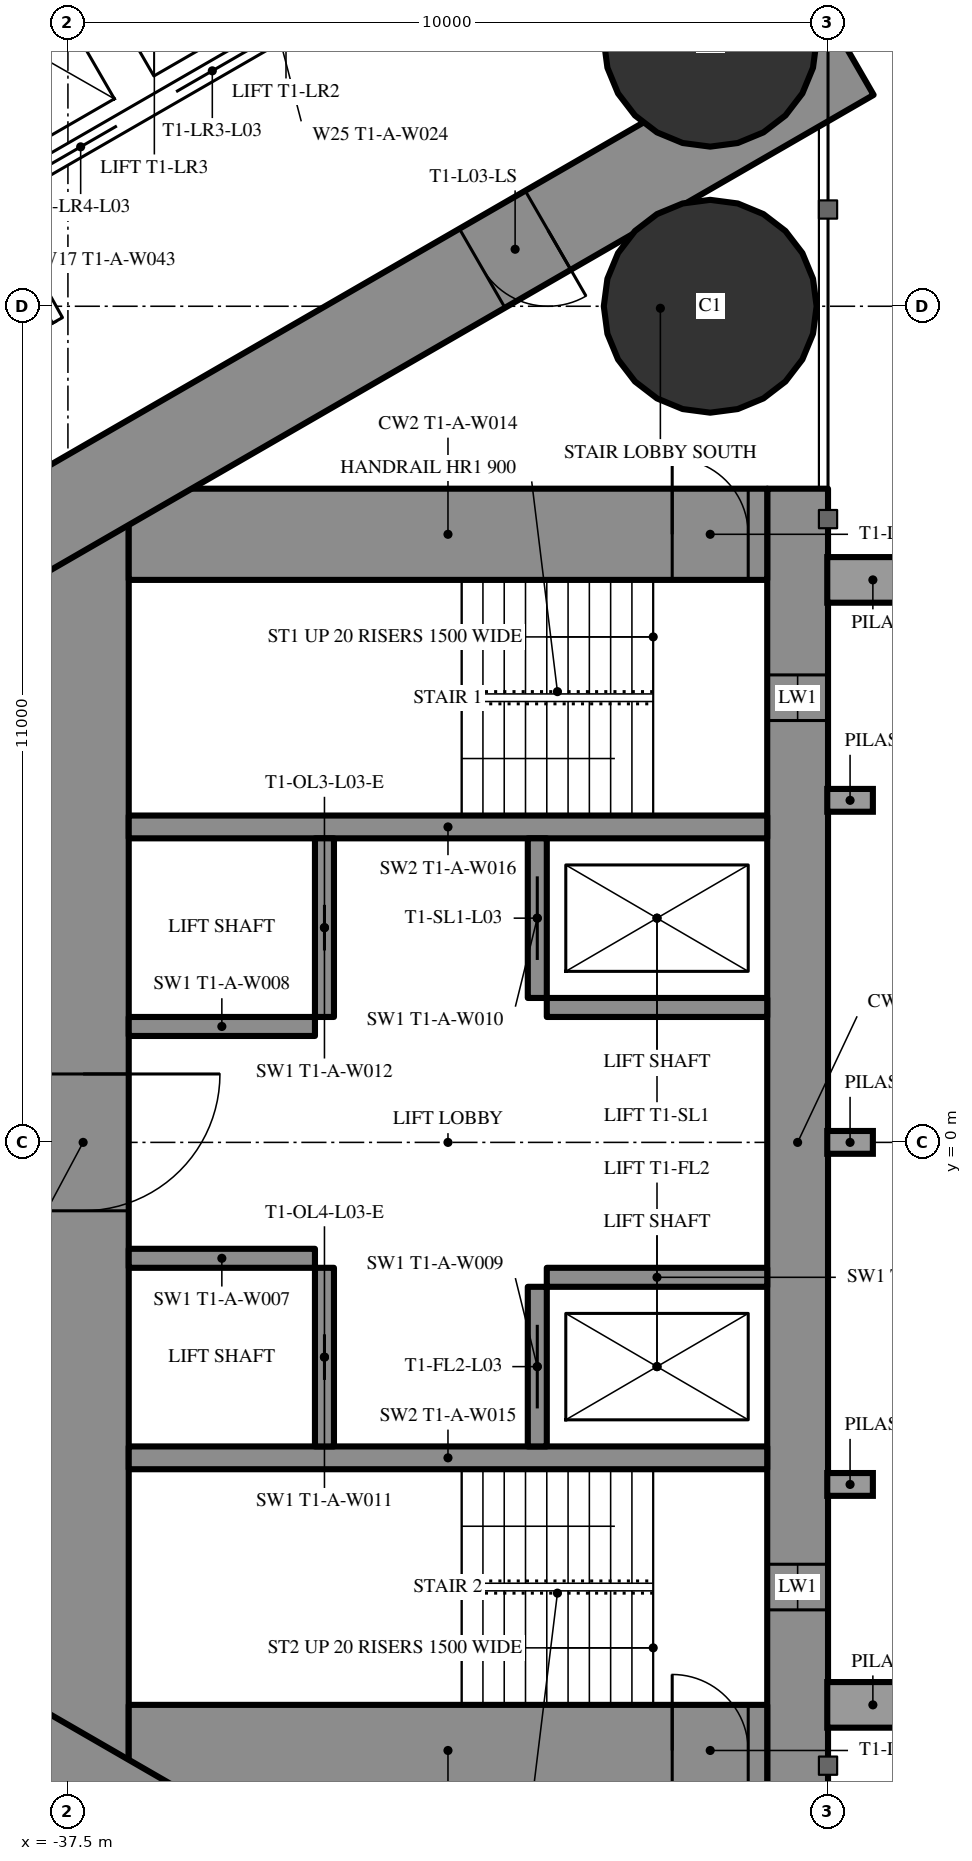
"""IFC4 building model, lengths in metres.
Left out: names, types, materials, properties, quantities, classifications, styles, units other than length and angle.
Written with IfcOpenShell. Run it as: python <this file> out.ifc"""

import sys

from ifc_helpers import new_model, si_unit, direction, frame, frame_2d, origin, origin_2d, place, context, subcontext, project, spatial, rectangle, hollow_circle, extrude, element, fill, save


model = new_model("IFC4")
c1 = context("Model", 3, precision=1e-05, world=origin(), true_north=direction((0.0, 1.0)))
c2 = subcontext(c1, "Body", "Model", "MODEL_VIEW")
j1 = project(units=[si_unit("LENGTHUNIT", "METRE"), si_unit("PLANEANGLEUNIT", "RADIAN")], contexts=[c1])
p1 = place(None, origin())
s1 = spatial("IfcSite", under=j1, at=p1, CompositionType="ELEMENT")
p2 = place(p1, origin())
s2 = spatial("IfcBuilding", under=s1, at=p2, CompositionType="ELEMENT")
p3 = place(p2, frame((0.0, 0.0, 18.0)))
s3 = spatial("IfcBuildingStorey", under=s2, at=p3, CompositionType="ELEMENT", Elevation=18.0)
for number, where, z_axis, x_axis in (
    (1, (-29.05, 11.0, 0.0), (0.0, 0.0, 1.0), (1.0, 0.0, 0.0)),
    (2, (-29.05, 14.5, 0.0), (0.0, 0.0, 1.0), (1.0, 0.0, 0.0)),
):
    element("IfcColumn", number, at=place(p3, frame(where, z_axis=z_axis, x_axis=x_axis)), inside=s3, PredefinedType="COLUMN", context=c2, shape_type="SweptSolid", body=[
        extrude(hollow_circle(Radius=1.4, WallThickness=0.12, at=origin_2d()), origin(), (0.0, 0.0, 1.0), 3.5),
    ])
p4 = place(p3, frame((-27.9, 8.6, 0.0), z_axis=(0.0, 0.0, 1.0), x_axis=(0.0, -1.0, 0.0)))
e3 = element("IfcWall", 3, at=p4, inside=s3, PredefinedType="SHEAR", context=c2, shape_type="SweptSolid", body=[
    extrude(rectangle(XDim=17.2, YDim=0.8, at=frame_2d((8.6, 0.0))), origin(), (0.0, 0.0, 1.0), 3.5),
])
p5 = place(p4, frame((2.45, 0.0, 0.6)))
e4 = element("IfcOpeningElement", 4, at=p5, cuts=e3, PredefinedType="OPENING", context=c2, shape_type="SweptSolid", body=[
    extrude(rectangle(XDim=0.6, YDim=2.1, at=frame_2d((0.3, 1.05))), frame((0.0, 0.41, 0.0), z_axis=(0.0, -1.0, 0.0), x_axis=(1.0, 0.0, 0.0)), (0.0, 0.0, 1.0), 0.82),
])
p6 = place(p4, frame((14.15, 0.0, 0.6)))
e5 = element("IfcOpeningElement", 5, at=p6, cuts=e3, PredefinedType="OPENING", context=c2, shape_type="SweptSolid", body=[
    extrude(rectangle(XDim=0.6, YDim=2.1, at=frame_2d((0.3, 1.05))), frame((0.0, 0.41, 0.0), z_axis=(0.0, -1.0, 0.0), x_axis=(1.0, 0.0, 0.0)), (0.0, 0.0, 1.0), 0.82),
])
p7 = place(p3, frame((-37.3, 8.6, 0.0), z_axis=(0.0, 0.0, 1.0), x_axis=(0.0, -1.0, 0.0)))
e6 = element("IfcWall", 6, at=p7, inside=s3, PredefinedType="SHEAR", context=c2, shape_type="SweptSolid", body=[
    extrude(rectangle(XDim=17.2, YDim=1.2, at=frame_2d((8.6, 0.0))), origin(), (0.0, 0.0, 1.0), 3.5),
])
p8 = place(p7, frame((7.7, 0.0, 0.0)))
e7 = element("IfcOpeningElement", 7, at=p8, cuts=e6, PredefinedType="OPENING", context=c2, shape_type="SweptSolid", body=[
    extrude(rectangle(XDim=1.8, YDim=2.2, at=frame_2d((0.9, 1.1))), frame((0.0, 0.61, 0.0), z_axis=(0.0, -1.0, 0.0), x_axis=(1.0, 0.0, 0.0)), (0.0, 0.0, 1.0), 1.22),
])
p9 = place(p3, frame((-28.3, 8.0, 0.0), z_axis=(0.0, 0.0, 1.0), x_axis=(-1.0, 0.0, 0.0)))
e8 = element("IfcWall", 8, at=p9, inside=s3, PredefinedType="SHEAR", context=c2, shape_type="SweptSolid", body=[
    extrude(rectangle(XDim=8.4, YDim=1.2, at=frame_2d((4.2, 0.0))), origin(), (0.0, 0.0, 1.0), 3.5),
])
p10 = place(p9, frame((0.25, 0.0, 0.0)))
e9 = element("IfcOpeningElement", 9, at=p10, cuts=e8, PredefinedType="OPENING", context=c2, shape_type="SweptSolid", body=[
    extrude(rectangle(XDim=1.0, YDim=2.2, at=frame_2d((0.5, 1.1))), frame((0.0, 0.61, 0.0), z_axis=(0.0, -1.0, 0.0), x_axis=(1.0, 0.0, 0.0)), (0.0, 0.0, 1.0), 1.22),
])
p11 = place(p3, frame((-28.3, -8.0, 0.0), z_axis=(0.0, 0.0, 1.0), x_axis=(-1.0, 0.0, 0.0)))
e10 = element("IfcWall", 10, at=p11, inside=s3, PredefinedType="SHEAR", context=c2, shape_type="SweptSolid", body=[
    extrude(rectangle(XDim=8.4, YDim=1.2, at=frame_2d((4.2, 0.0))), origin(), (0.0, 0.0, 1.0), 3.5),
])
p12 = place(p11, frame((0.25, 0.0, 0.0)))
e11 = element("IfcOpeningElement", 11, at=p12, cuts=e10, PredefinedType="OPENING", context=c2, shape_type="SweptSolid", body=[
    extrude(rectangle(XDim=1.0, YDim=2.2, at=frame_2d((0.5, 1.1))), frame((0.0, 0.61, 0.0), z_axis=(0.0, -1.0, 0.0), x_axis=(1.0, 0.0, 0.0)), (0.0, 0.0, 1.0), 1.22),
])
for number, where, z_axis, x_axis in (
    (12, (-28.3, 4.15, 0.0), (0.0, 0.0, 1.0), (-1.0, 0.0, 0.0)),
    (13, (-28.3, -4.15, 0.0), (0.0, 0.0, 1.0), (-1.0, 0.0, 0.0)),
):
    element("IfcWall", number, at=place(p3, frame(where, z_axis=z_axis, x_axis=x_axis)), inside=s3, PredefinedType="SHEAR", context=c2, shape_type="SweptSolid", body=[
        extrude(rectangle(XDim=8.4, YDim=0.3, at=frame_2d((4.2, 0.0))), origin(), (0.0, 0.0, 1.0), 3.5),
    ])
p13 = place(p3, frame((-31.325, 4.0, 0.0), z_axis=(0.0, 0.0, 1.0), x_axis=(0.0, -1.0, 0.0)))
e14 = element("IfcWall", 14, at=p13, inside=s3, PredefinedType="SHEAR", context=c2, shape_type="SweptSolid", body=[
    extrude(rectangle(XDim=2.1, YDim=0.25, at=frame_2d((1.05, 0.0))), origin(), (0.0, 0.0, 1.0), 3.5),
])
p14 = place(p13, frame((0.5, 0.0, 0.0)))
e15 = element("IfcOpeningElement", 15, at=p14, cuts=e14, PredefinedType="OPENING", context=c2, shape_type="SweptSolid", body=[
    extrude(rectangle(XDim=1.1, YDim=2.2, at=frame_2d((0.55, 1.1))), frame((0.0, 0.135, 0.0), z_axis=(0.0, -1.0, 0.0), x_axis=(1.0, 0.0, 0.0)), (0.0, 0.0, 1.0), 0.27),
])
p15 = place(p3, frame((-34.125, 4.0, 0.0), z_axis=(0.0, 0.0, 1.0), x_axis=(0.0, -1.0, 0.0)))
e16 = element("IfcWall", 16, at=p15, inside=s3, PredefinedType="SHEAR", context=c2, shape_type="SweptSolid", body=[
    extrude(rectangle(XDim=2.35, YDim=0.25, at=frame_2d((1.175, 0.0))), origin(), (0.0, 0.0, 1.0), 3.5),
])
p16 = place(p15, frame((0.875, 0.0, 0.0)))
e17 = element("IfcOpeningElement", 17, at=p16, cuts=e16, PredefinedType="OPENING", context=c2, shape_type="SweptSolid", body=[
    extrude(rectangle(XDim=0.6, YDim=2.0, at=frame_2d((0.3, 1.0))), frame((0.0, 0.135, 0.0), z_axis=(0.0, -1.0, 0.0), x_axis=(1.0, 0.0, 0.0)), (0.0, 0.0, 1.0), 0.27),
])
p17 = place(p3, frame((-28.3, 1.775, 0.0), z_axis=(0.0, 0.0, 1.0), x_axis=(-1.0, 0.0, 0.0)))
e18 = element("IfcWall", 18, at=p17, inside=s3, PredefinedType="SHEAR", context=c2, shape_type="SweptSolid", body=[
    extrude(rectangle(XDim=2.9, YDim=0.25, at=frame_2d((1.45, 0.0))), origin(), (0.0, 0.0, 1.0), 3.5),
])
p18 = place(p3, frame((-34.25, 1.525, 0.0), z_axis=(0.0, 0.0, 1.0), x_axis=(-1.0, 0.0, 0.0)))
e19 = element("IfcWall", 19, at=p18, inside=s3, PredefinedType="SHEAR", context=c2, shape_type="SweptSolid", body=[
    extrude(rectangle(XDim=2.45, YDim=0.25, at=frame_2d((1.225, 0.0))), origin(), (0.0, 0.0, 1.0), 3.5),
])
p19 = place(p3, frame((-31.325, -1.9, 0.0), z_axis=(0.0, 0.0, 1.0), x_axis=(0.0, -1.0, 0.0)))
e20 = element("IfcWall", 20, at=p19, inside=s3, PredefinedType="SHEAR", context=c2, shape_type="SweptSolid", body=[
    extrude(rectangle(XDim=2.1, YDim=0.25, at=frame_2d((1.05, 0.0))), origin(), (0.0, 0.0, 1.0), 3.5),
])
p20 = place(p19, frame((0.5, 0.0, 0.0)))
e21 = element("IfcOpeningElement", 21, at=p20, cuts=e20, PredefinedType="OPENING", context=c2, shape_type="SweptSolid", body=[
    extrude(rectangle(XDim=1.1, YDim=2.2, at=frame_2d((0.55, 1.1))), frame((0.0, 0.135, 0.0), z_axis=(0.0, -1.0, 0.0), x_axis=(1.0, 0.0, 0.0)), (0.0, 0.0, 1.0), 0.27),
])
p21 = place(p3, frame((-34.125, -1.65, 0.0), z_axis=(0.0, 0.0, 1.0), x_axis=(0.0, -1.0, 0.0)))
e22 = element("IfcWall", 22, at=p21, inside=s3, PredefinedType="SHEAR", context=c2, shape_type="SweptSolid", body=[
    extrude(rectangle(XDim=2.35, YDim=0.25, at=frame_2d((1.175, 0.0))), origin(), (0.0, 0.0, 1.0), 3.5),
])
p22 = place(p21, frame((0.875, 0.0, 0.0)))
e23 = element("IfcOpeningElement", 23, at=p22, cuts=e22, PredefinedType="OPENING", context=c2, shape_type="SweptSolid", body=[
    extrude(rectangle(XDim=0.6, YDim=2.0, at=frame_2d((0.3, 1.0))), frame((0.0, 0.135, 0.0), z_axis=(0.0, -1.0, 0.0), x_axis=(1.0, 0.0, 0.0)), (0.0, 0.0, 1.0), 0.27),
])
p23 = place(p3, frame((-28.3, -1.775, 0.0), z_axis=(0.0, 0.0, 1.0), x_axis=(-1.0, 0.0, 0.0)))
e24 = element("IfcWall", 24, at=p23, inside=s3, PredefinedType="SHEAR", context=c2, shape_type="SweptSolid", body=[
    extrude(rectangle(XDim=2.9, YDim=0.25, at=frame_2d((1.45, 0.0))), origin(), (0.0, 0.0, 1.0), 3.5),
])
p24 = place(p3, frame((-34.25, -1.525, 0.0), z_axis=(0.0, 0.0, 1.0), x_axis=(-1.0, 0.0, 0.0)))
e25 = element("IfcWall", 25, at=p24, inside=s3, PredefinedType="SHEAR", context=c2, shape_type="SweptSolid", body=[
    extrude(rectangle(XDim=2.45, YDim=0.25, at=frame_2d((1.225, 0.0))), origin(), (0.0, 0.0, 1.0), 3.5),
])
p25 = place(p3, frame((-27.2, 14.3, 0.0), z_axis=(0.0, 0.0, 1.0), x_axis=(-0.866026593062, -0.499997940104, 0.0)))
e26 = element("IfcWall", 26, at=p25, inside=s3, PredefinedType="SHEAR", context=c2, shape_type="SweptSolid", body=[
    extrude(rectangle(XDim=28.946, YDim=1.2, at=frame_2d((14.473, 0.0))), origin(), (0.0, 0.0, 1.0), 3.5),
])
p26 = place(p25, frame((4.6, 0.0, 0.0)))
e27 = element("IfcOpeningElement", 27, at=p26, cuts=e26, PredefinedType="OPENING", context=c2, shape_type="SweptSolid", body=[
    extrude(rectangle(XDim=1.0, YDim=2.2, at=frame_2d((0.5, 1.1))), frame((0.0, 0.61, 0.0), z_axis=(0.0, -1.0, 0.0), x_axis=(1.0, 0.0, 0.0)), (0.0, 0.0, 1.0), 1.22),
])
p27 = place(p25, frame((13.395, 0.0, 0.0)))
e28 = element("IfcOpeningElement", 28, at=p27, cuts=e26, PredefinedType="OPENING", context=c2, shape_type="SweptSolid", body=[
    extrude(rectangle(XDim=1.8, YDim=2.2, at=frame_2d((0.9, 1.1))), frame((0.0, 0.61, 0.0), z_axis=(0.0, -1.0, 0.0), x_axis=(1.0, 0.0, 0.0)), (0.0, 0.0, 1.0), 1.22),
])
p28 = place(p3, frame((-27.2, -14.3, 0.0), z_axis=(0.0, 0.0, 1.0), x_axis=(-0.866024021859, 0.500002393557, 0.0)))
e29 = element("IfcWall", 29, at=p28, inside=s3, PredefinedType="SHEAR", context=c2, shape_type="SweptSolid", body=[
    extrude(rectangle(XDim=27.907, YDim=1.2, at=frame_2d((13.954, 0.0))), origin(), (0.0, 0.0, 1.0), 3.5),
])
p29 = place(p28, frame((4.6, 0.0, 0.0)))
e30 = element("IfcOpeningElement", 30, at=p29, cuts=e29, PredefinedType="OPENING", context=c2, shape_type="SweptSolid", body=[
    extrude(rectangle(XDim=1.0, YDim=2.2, at=frame_2d((0.5, 1.1))), frame((0.0, 0.61, 0.0), z_axis=(0.0, -1.0, 0.0), x_axis=(1.0, 0.0, 0.0)), (0.0, 0.0, 1.0), 1.22),
])
p30 = place(p28, frame((13.395, 0.0, 0.0)))
e31 = element("IfcOpeningElement", 31, at=p30, cuts=e29, PredefinedType="OPENING", context=c2, shape_type="SweptSolid", body=[
    extrude(rectangle(XDim=1.8, YDim=2.2, at=frame_2d((0.9, 1.1))), frame((0.0, 0.61, 0.0), z_axis=(0.0, -1.0, 0.0), x_axis=(1.0, 0.0, 0.0)), (0.0, 0.0, 1.0), 1.22),
])
p31 = place(p3, frame((-37.7, 10.894, 0.0), z_axis=(0.0, 0.0, 1.0), x_axis=(-0.866027905338, -0.499995667157, 0.0)))
e32 = element("IfcWall", 32, at=p31, inside=s3, PredefinedType="PARTITIONING", context=c2, shape_type="SweptSolid", body=[
    extrude(rectangle(XDim=21.787, YDim=0.2, at=frame_2d((10.894, 0.0))), origin(), (0.0, 0.0, 1.0), 3.25),
])
p32 = place(p31, frame((11.78, 0.0, 0.0)))
e33 = element("IfcOpeningElement", 33, at=p32, cuts=e32, PredefinedType="OPENING", context=c2, shape_type="SweptSolid", body=[
    extrude(rectangle(XDim=0.95, YDim=2.2, at=frame_2d((0.475, 1.1))), frame((0.0, 0.11, 0.0), z_axis=(0.0, -1.0, 0.0), x_axis=(1.0, 0.0, 0.0)), (0.0, 0.0, 1.0), 0.22),
])
p33 = place(p31, frame((7.73, 0.0, 0.0)))
e34 = element("IfcOpeningElement", 34, at=p33, cuts=e32, PredefinedType="OPENING", context=c2, shape_type="SweptSolid", body=[
    extrude(rectangle(XDim=0.95, YDim=2.2, at=frame_2d((0.475, 1.1))), frame((0.0, 0.11, 0.0), z_axis=(0.0, -1.0, 0.0), x_axis=(1.0, 0.0, 0.0)), (0.0, 0.0, 1.0), 0.22),
])
p34 = place(p3, frame((-36.92, -11.344, 0.0), z_axis=(0.0, 0.0, 1.0), x_axis=(-0.866028313256, 0.499994960614, 0.0)))
e35 = element("IfcWall", 35, at=p34, inside=s3, PredefinedType="PARTITIONING", context=c2, shape_type="SweptSolid", body=[
    extrude(rectangle(XDim=22.568, YDim=0.2, at=frame_2d((11.284, 0.0))), origin(), (0.0, 0.0, 1.0), 3.25),
])
p35 = place(p34, frame((15.03, 0.0, 0.0)))
e36 = element("IfcOpeningElement", 36, at=p35, cuts=e35, PredefinedType="OPENING", context=c2, shape_type="SweptSolid", body=[
    extrude(rectangle(XDim=0.95, YDim=2.2, at=frame_2d((0.475, 1.1))), frame((0.0, 0.11, 0.0), z_axis=(0.0, -1.0, 0.0), x_axis=(1.0, 0.0, 0.0)), (0.0, 0.0, 1.0), 0.22),
])
p36 = place(p34, frame((3.35, 0.0, 0.0)))
e37 = element("IfcOpeningElement", 37, at=p36, cuts=e35, PredefinedType="OPENING", context=c2, shape_type="SweptSolid", body=[
    extrude(rectangle(XDim=1.0, YDim=2.2, at=frame_2d((0.5, 1.1))), frame((0.0, 0.11, 0.0), z_axis=(0.0, -1.0, 0.0), x_axis=(1.0, 0.0, 0.0)), (0.0, 0.0, 1.0), 0.22),
])
p37 = place(p3, frame((-38.513, 12.392, 0.0), z_axis=(0.0, 0.0, 1.0), x_axis=(0.485585508183, -0.874189175317, 0.0)))
e38 = element("IfcWall", 38, at=p37, inside=s3, PredefinedType="PARTITIONING", context=c2, shape_type="SweptSolid", body=[
    extrude(rectangle(XDim=1.805, YDim=0.15, at=frame_2d((0.902, 0.0))), origin(), (0.0, 0.0, 1.0), 3.25),
])
p38 = place(p3, frame((-31.01, 16.747, 0.0), z_axis=(0.0, 0.0, 1.0), x_axis=(-0.866028165386, -0.499995216735, 0.0)))
e39 = element("IfcWall", 39, at=p38, inside=s3, PredefinedType="PARTITIONING", context=c2, shape_type="SweptSolid", body=[
    extrude(rectangle(XDim=8.6, YDim=0.25, at=frame_2d((4.3, 0.0))), origin(), (0.0, 0.0, 1.0), 3.25),
])
p39 = place(p38, frame((0.75, 0.0, 0.0)))
e40 = element("IfcOpeningElement", 40, at=p39, cuts=e39, PredefinedType="OPENING", context=c2, shape_type="SweptSolid", body=[
    extrude(rectangle(XDim=1.1, YDim=2.2, at=frame_2d((0.55, 1.1))), frame((0.0, 0.135, 0.0), z_axis=(0.0, -1.0, 0.0), x_axis=(1.0, 0.0, 0.0)), (0.0, 0.0, 1.0), 0.27),
])
p40 = place(p38, frame((2.75, 0.0, 0.0)))
e41 = element("IfcOpeningElement", 41, at=p40, cuts=e39, PredefinedType="OPENING", context=c2, shape_type="SweptSolid", body=[
    extrude(rectangle(XDim=1.1, YDim=2.2, at=frame_2d((0.55, 1.1))), frame((0.0, 0.135, 0.0), z_axis=(0.0, -1.0, 0.0), x_axis=(1.0, 0.0, 0.0)), (0.0, 0.0, 1.0), 0.27),
])
p41 = place(p38, frame((4.75, 0.0, 0.0)))
e42 = element("IfcOpeningElement", 42, at=p41, cuts=e39, PredefinedType="OPENING", context=c2, shape_type="SweptSolid", body=[
    extrude(rectangle(XDim=1.1, YDim=2.2, at=frame_2d((0.55, 1.1))), frame((0.0, 0.135, 0.0), z_axis=(0.0, -1.0, 0.0), x_axis=(1.0, 0.0, 0.0)), (0.0, 0.0, 1.0), 0.27),
])
p42 = place(p38, frame((6.75, 0.0, 0.0)))
e43 = element("IfcOpeningElement", 43, at=p42, cuts=e39, PredefinedType="OPENING", context=c2, shape_type="SweptSolid", body=[
    extrude(rectangle(XDim=1.1, YDim=2.2, at=frame_2d((0.55, 1.1))), frame((0.0, 0.135, 0.0), z_axis=(0.0, -1.0, 0.0), x_axis=(1.0, 0.0, 0.0)), (0.0, 0.0, 1.0), 0.27),
])
p43 = place(p26, origin())
e44 = element("IfcDoor", 44, at=p43, inside=s3, OperationType="SINGLE_SWING_LEFT", PredefinedType="DOOR", context=c2, shape_type="SweptSolid", body=[
    extrude(rectangle(XDim=1.0, YDim=2.2, at=frame_2d((0.5, 1.1))), frame((0.0, 0.025, 0.0), z_axis=(0.0, -1.0, 0.0), x_axis=(1.0, 0.0, 0.0)), (0.0, 0.0, 1.0), 0.05),
])
fill(e27, e44)
p44 = place(p8, origin())
e45 = element("IfcDoor", 45, at=p44, inside=s3, OperationType="DOUBLE_DOOR_SINGLE_SWING", PredefinedType="DOOR", context=c2, shape_type="SweptSolid", body=[
    extrude(rectangle(XDim=1.8, YDim=2.2, at=frame_2d((0.9, 1.1))), frame((0.0, 0.025, 0.0), z_axis=(0.0, -1.0, 0.0), x_axis=(1.0, 0.0, 0.0)), (0.0, 0.0, 1.0), 0.05),
])
fill(e7, e45)
p45 = place(p10, origin())
e46 = element("IfcDoor", 46, at=p45, inside=s3, OperationType="SINGLE_SWING_RIGHT", PredefinedType="DOOR", context=c2, shape_type="SweptSolid", body=[
    extrude(rectangle(XDim=1.0, YDim=2.2, at=frame_2d((0.5, 1.1))), frame((0.0, 0.025, 0.0), z_axis=(0.0, -1.0, 0.0), x_axis=(1.0, 0.0, 0.0)), (0.0, 0.0, 1.0), 0.05),
])
fill(e9, e46)
p46 = place(p12, origin())
e47 = element("IfcDoor", 47, at=p46, inside=s3, OperationType="SINGLE_SWING_RIGHT", PredefinedType="DOOR", context=c2, shape_type="SweptSolid", body=[
    extrude(rectangle(XDim=1.0, YDim=2.2, at=frame_2d((0.5, 1.1))), frame((0.0, 0.025, 0.0), z_axis=(0.0, -1.0, 0.0), x_axis=(1.0, 0.0, 0.0)), (0.0, 0.0, 1.0), 0.05),
])
fill(e11, e47)
p47 = place(p14, origin())
e48 = element("IfcDoor", 48, at=p47, inside=s3, OperationType="SLIDING_TO_LEFT", PredefinedType="USERDEFINED", context=c2, shape_type="SweptSolid", body=[
    extrude(rectangle(XDim=1.1, YDim=2.2, at=frame_2d((0.55, 1.1))), frame((0.0, 0.025, 0.0), z_axis=(0.0, -1.0, 0.0), x_axis=(1.0, 0.0, 0.0)), (0.0, 0.0, 1.0), 0.05),
])
fill(e15, e48)
p48 = place(p20, origin())
e49 = element("IfcDoor", 49, at=p48, inside=s3, OperationType="SLIDING_TO_LEFT", PredefinedType="USERDEFINED", context=c2, shape_type="SweptSolid", body=[
    extrude(rectangle(XDim=1.1, YDim=2.2, at=frame_2d((0.55, 1.1))), frame((0.0, 0.025, 0.0), z_axis=(0.0, -1.0, 0.0), x_axis=(1.0, 0.0, 0.0)), (0.0, 0.0, 1.0), 0.05),
])
fill(e21, e49)
p49 = place(p16, origin())
e50 = element("IfcDoor", 50, at=p49, inside=s3, OperationType="SLIDING_TO_LEFT", PredefinedType="DOOR", context=c2, shape_type="SweptSolid", body=[
    extrude(rectangle(XDim=0.6, YDim=2.0, at=frame_2d((0.3, 1.0))), frame((0.0, 0.025, 0.0), z_axis=(0.0, -1.0, 0.0), x_axis=(1.0, 0.0, 0.0)), (0.0, 0.0, 1.0), 0.05),
])
fill(e17, e50)
p50 = place(p22, origin())
e51 = element("IfcDoor", 51, at=p50, inside=s3, OperationType="SLIDING_TO_LEFT", PredefinedType="DOOR", context=c2, shape_type="SweptSolid", body=[
    extrude(rectangle(XDim=0.6, YDim=2.0, at=frame_2d((0.3, 1.0))), frame((0.0, 0.025, 0.0), z_axis=(0.0, -1.0, 0.0), x_axis=(1.0, 0.0, 0.0)), (0.0, 0.0, 1.0), 0.05),
])
fill(e23, e51)
p51 = place(p41, origin())
e52 = element("IfcDoor", 52, at=p51, inside=s3, OperationType="DOUBLE_DOOR_SLIDING", PredefinedType="USERDEFINED", context=c2, shape_type="SweptSolid", body=[
    extrude(rectangle(XDim=1.1, YDim=2.2, at=frame_2d((0.55, 1.1))), frame((0.0, 0.025, 0.0), z_axis=(0.0, -1.0, 0.0), x_axis=(1.0, 0.0, 0.0)), (0.0, 0.0, 1.0), 0.05),
])
fill(e42, e52)
p52 = place(p42, origin())
e53 = element("IfcDoor", 53, at=p52, inside=s3, OperationType="DOUBLE_DOOR_SLIDING", PredefinedType="USERDEFINED", context=c2, shape_type="SweptSolid", body=[
    extrude(rectangle(XDim=1.1, YDim=2.2, at=frame_2d((0.55, 1.1))), frame((0.0, 0.025, 0.0), z_axis=(0.0, -1.0, 0.0), x_axis=(1.0, 0.0, 0.0)), (0.0, 0.0, 1.0), 0.05),
])
fill(e43, e53)
p53 = place(p5, origin())
e54 = element("IfcWindow", 54, at=p53, inside=s3, PartitioningType="SINGLE_PANEL", PredefinedType="WINDOW", context=c2, shape_type="SweptSolid", body=[
    extrude(rectangle(XDim=0.6, YDim=2.1, at=frame_2d((0.3, 1.05))), frame((0.0, 0.03, 0.0), z_axis=(0.0, -1.0, 0.0), x_axis=(1.0, 0.0, 0.0)), (0.0, 0.0, 1.0), 0.06),
])
fill(e4, e54)
p54 = place(p6, origin())
e55 = element("IfcWindow", 55, at=p54, inside=s3, PartitioningType="SINGLE_PANEL", PredefinedType="WINDOW", context=c2, shape_type="SweptSolid", body=[
    extrude(rectangle(XDim=0.6, YDim=2.1, at=frame_2d((0.3, 1.05))), frame((0.0, 0.03, 0.0), z_axis=(0.0, -1.0, 0.0), x_axis=(1.0, 0.0, 0.0)), (0.0, 0.0, 1.0), 0.06),
])
fill(e5, e55)
save(model, sys.argv[1])
